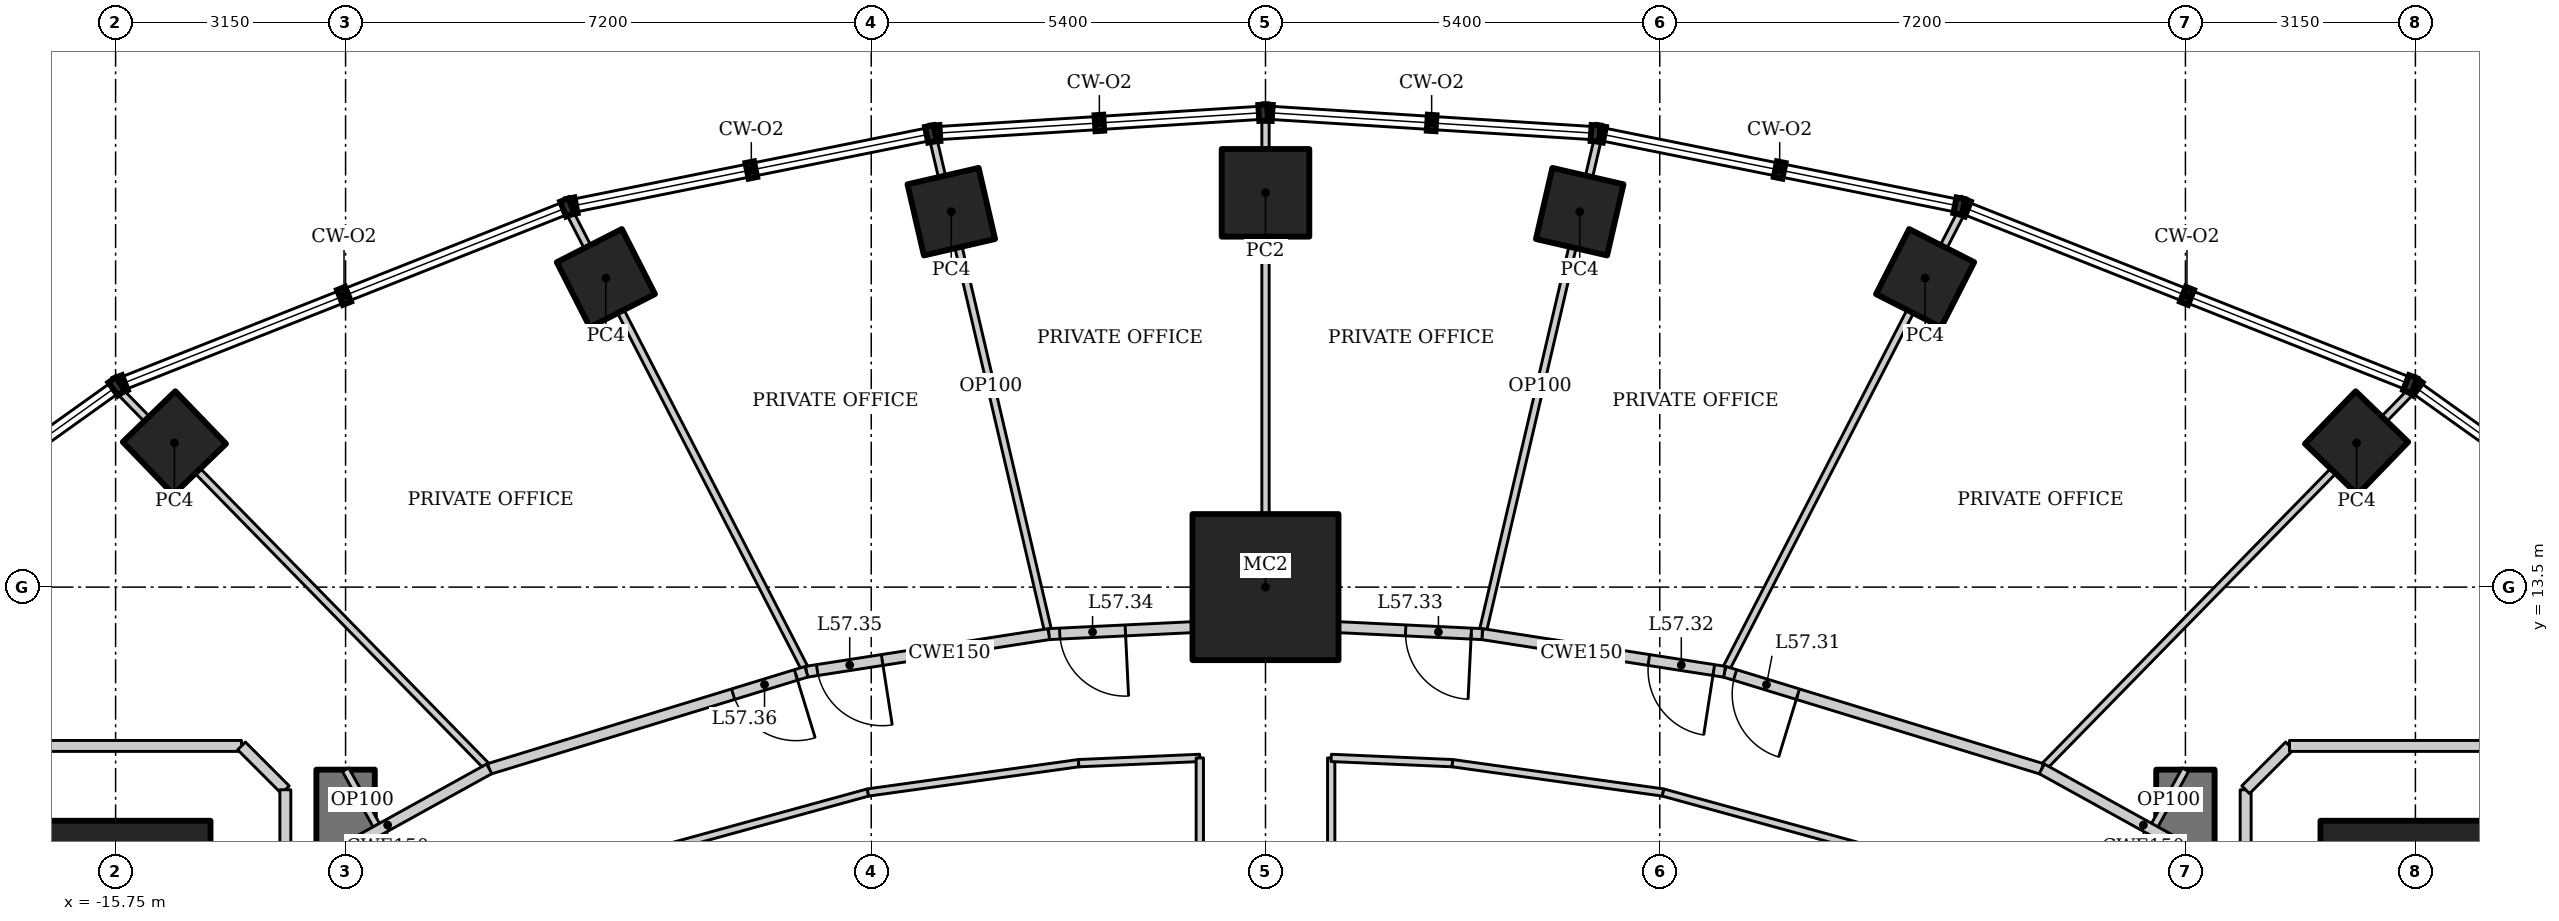
"""IFC4 building model, lengths in metres.
Left out: names, types, materials, properties, quantities, classifications, styles, units other than length and angle.
Written with IfcOpenShell. Run it as: python <this file> out.ifc"""

import sys

from ifc_helpers import new_model, si_unit, direction, frame, frame_2d, origin, origin_2d, place, context, subcontext, project, spatial, rectangle, hollow_rectangle, extrude, element, fill, save


model = new_model("IFC4")
c1 = context("Model", 3, precision=1e-05, world=origin(), true_north=direction((0.0, 1.0)))
c2 = subcontext(c1, "Body", "Model", "MODEL_VIEW")
j1 = project(units=[si_unit("LENGTHUNIT", "METRE"), si_unit("PLANEANGLEUNIT", "RADIAN")], contexts=[c1])
p1 = place(None, origin())
s1 = spatial("IfcSite", under=j1, at=p1, CompositionType="ELEMENT")
p2 = place(p1, origin())
s2 = spatial("IfcBuilding", under=s1, at=p2, CompositionType="ELEMENT")
p3 = place(p2, frame((0.0, 0.0, 245.2)))
s3 = spatial("IfcBuildingStorey", under=s2, at=p3, CompositionType="ELEMENT", Elevation=245.2)
p4 = place(p3, frame((15.75, 9.0, 0.0), z_axis=(0.0, 0.0, 1.0), x_axis=(1.0, 0.0, 0.0)))
e1 = element("IfcColumn", 1, at=p4, inside=s3, PredefinedType="COLUMN", context=c2, shape_type="SweptSolid", body=[
    extrude(hollow_rectangle(XDim=2.6, YDim=2.6, WallThickness=0.13, at=origin_2d()), origin(), (0.0, 0.0, 1.0), 4.2),
])
p5 = place(p3, frame((0.0, 13.5, 0.0), z_axis=(0.0, 0.0, 1.0), x_axis=(1.0, 0.0, 0.0)))
e2 = element("IfcColumn", 2, at=p5, inside=s3, PredefinedType="COLUMN", context=c2, shape_type="SweptSolid", body=[
    extrude(hollow_rectangle(XDim=2.0, YDim=2.0, WallThickness=0.17, at=origin_2d()), origin(), (0.0, 0.0, 1.0), 4.2),
])
p6 = place(p3, frame((-15.75, 9.0, 0.0), z_axis=(0.0, 0.0, 1.0), x_axis=(1.0, 0.0, 0.0)))
e3 = element("IfcColumn", 3, at=p6, inside=s3, PredefinedType="COLUMN", context=c2, shape_type="SweptSolid", body=[
    extrude(hollow_rectangle(XDim=2.6, YDim=2.6, WallThickness=0.13, at=origin_2d()), origin(), (0.0, 0.0, 1.0), 4.2),
])
for number, where, z_axis, x_axis in (
    (4, (14.944, 15.475, 0.0), (0.0, 0.0, 1.0), (0.695, 0.719, 0.0)),
    (5, (9.035, 17.731, 0.0), (0.0, 0.0, 1.0), (0.454, 0.891, 0.0)),
    (6, (4.304, 18.642, 0.0), (0.0, 0.0, 1.0), (0.225, 0.974, 0.0)),
):
    element("IfcColumn", number, at=place(p3, frame(where, z_axis=z_axis, x_axis=x_axis)), inside=s3, PredefinedType="COLUMN", context=c2, shape_type="SweptSolid", body=[
        extrude(hollow_rectangle(XDim=1.0, YDim=1.0, WallThickness=0.08, at=origin_2d()), origin(), (0.0, 0.0, 1.0), 4.2),
    ])
p7 = place(p3, frame((0.0, 18.9, 0.0), z_axis=(0.0, 0.0, 1.0), x_axis=(1.0, 0.0, 0.0)))
e7 = element("IfcColumn", 7, at=p7, inside=s3, PredefinedType="COLUMN", context=c2, shape_type="SweptSolid", body=[
    extrude(hollow_rectangle(XDim=1.2, YDim=1.2, WallThickness=0.1, at=origin_2d()), origin(), (0.0, 0.0, 1.0), 4.2),
])
for number, where, z_axis, x_axis in (
    (8, (-4.304, 18.642, 0.0), (0.0, 0.0, 1.0), (0.974, 0.225, 0.0)),
    (9, (-9.035, 17.731, 0.0), (0.0, 0.0, 1.0), (0.891, 0.454, 0.0)),
    (10, (-14.944, 15.475, 0.0), (0.0, 0.0, 1.0), (0.719, 0.695, 0.0)),
):
    element("IfcColumn", number, at=place(p3, frame(where, z_axis=z_axis, x_axis=x_axis)), inside=s3, PredefinedType="COLUMN", context=c2, shape_type="SweptSolid", body=[
        extrude(hollow_rectangle(XDim=1.0, YDim=1.0, WallThickness=0.08, at=origin_2d()), origin(), (0.0, 0.0, 1.0), 4.2),
    ])
p8 = place(p3, frame((12.6, -11.0, 0.0), z_axis=(0.0, 0.0, 1.0), x_axis=(0.0, 1.0, 0.0)))
e11 = element("IfcWall", 11, at=p8, inside=s3, PredefinedType="SHEAR", context=c2, shape_type="SweptSolid", body=[
    extrude(rectangle(XDim=22.0, YDim=0.8, at=frame_2d((11.0, 0.0))), origin(), (0.0, 0.0, 1.0), 4.2),
])
p9 = place(p8, frame((10.1, 0.0, 0.0)))
e12 = element("IfcOpeningElement", 12, at=p9, cuts=e11, PredefinedType="OPENING", context=c2, shape_type="SweptSolid", body=[
    extrude(rectangle(XDim=1.8, YDim=2.1, at=frame_2d((0.9, 1.05))), frame((0.0, 0.41, 0.0), z_axis=(0.0, -1.0, 0.0), x_axis=(1.0, 0.0, 0.0)), (0.0, 0.0, 1.0), 0.82),
])
p10 = place(p3, frame((-12.6, 11.0, 0.0), z_axis=(0.0, 0.0, 1.0), x_axis=(0.0, -1.0, 0.0)))
e13 = element("IfcWall", 13, at=p10, inside=s3, PredefinedType="SHEAR", context=c2, shape_type="SweptSolid", body=[
    extrude(rectangle(XDim=22.0, YDim=0.8, at=frame_2d((11.0, 0.0))), origin(), (0.0, 0.0, 1.0), 4.2),
])
p11 = place(p10, frame((10.1, 0.0, 0.0)))
e14 = element("IfcOpeningElement", 14, at=p11, cuts=e13, PredefinedType="OPENING", context=c2, shape_type="SweptSolid", body=[
    extrude(rectangle(XDim=1.8, YDim=2.1, at=frame_2d((0.9, 1.05))), frame((0.0, 0.41, 0.0), z_axis=(0.0, -1.0, 0.0), x_axis=(1.0, 0.0, 0.0)), (0.0, 0.0, 1.0), 0.82),
])
p12 = place(p3, frame((15.709, 16.199, 0.0), z_axis=(0.0, 0.0, 1.0), x_axis=(-0.699362525935, -0.714767135029, 0.0)))
e15 = element("IfcWall", 15, at=p12, inside=s3, PredefinedType="PARTITIONING", context=c2, shape_type="SweptSolid", body=[
    extrude(rectangle(XDim=7.259, YDim=0.1, at=frame_2d((3.629, 0.0))), origin(), (0.0, 0.0, 1.0), 3.41),
])
p13 = place(p3, frame((9.54, 18.65, 0.0), z_axis=(0.0, 0.0, 1.0), x_axis=(-0.45810402165, -0.88889859115, 0.0)))
e16 = element("IfcWall", 16, at=p13, inside=s3, PredefinedType="PARTITIONING", context=c2, shape_type="SweptSolid", body=[
    extrude(rectangle(XDim=7.098, YDim=0.1, at=frame_2d((3.549, 0.0))), origin(), (0.0, 0.0, 1.0), 3.108),
])
p14 = place(p3, frame((4.556, 19.657, 0.0), z_axis=(0.0, 0.0, 1.0), x_axis=(-0.22733791689, -0.973815933092, 0.0)))
e17 = element("IfcWall", 17, at=p14, inside=s3, PredefinedType="PARTITIONING", context=c2, shape_type="SweptSolid", body=[
    extrude(rectangle(XDim=6.984, YDim=0.1, at=frame_2d((3.492, 0.0))), origin(), (0.0, 0.0, 1.0), 3.108),
])
p15 = place(p3, frame((0.0, 19.945, 0.0), z_axis=(0.0, 0.0, 1.0), x_axis=(0.0, -1.0, 0.0)))
e18 = element("IfcWall", 18, at=p15, inside=s3, PredefinedType="PARTITIONING", context=c2, shape_type="SweptSolid", body=[
    extrude(rectangle(XDim=6.945, YDim=0.1, at=frame_2d((3.472, 0.0))), origin(), (0.0, 0.0, 1.0), 3.644),
])
p16 = place(p3, frame((-4.556, 19.657, 0.0), z_axis=(0.0, 0.0, 1.0), x_axis=(0.22733791689, -0.973815933092, 0.0)))
e19 = element("IfcWall", 19, at=p16, inside=s3, PredefinedType="PARTITIONING", context=c2, shape_type="SweptSolid", body=[
    extrude(rectangle(XDim=6.984, YDim=0.1, at=frame_2d((3.492, 0.0))), origin(), (0.0, 0.0, 1.0), 3.108),
])
p17 = place(p3, frame((-9.54, 18.65, 0.0), z_axis=(0.0, 0.0, 1.0), x_axis=(0.45810402165, -0.88889859115, 0.0)))
e20 = element("IfcWall", 20, at=p17, inside=s3, PredefinedType="PARTITIONING", context=c2, shape_type="SweptSolid", body=[
    extrude(rectangle(XDim=7.098, YDim=0.1, at=frame_2d((3.549, 0.0))), origin(), (0.0, 0.0, 1.0), 3.108),
])
p18 = place(p3, frame((-15.709, 16.199, 0.0), z_axis=(0.0, 0.0, 1.0), x_axis=(0.699362525935, -0.714767135029, 0.0)))
e21 = element("IfcWall", 21, at=p18, inside=s3, PredefinedType="PARTITIONING", context=c2, shape_type="SweptSolid", body=[
    extrude(rectangle(XDim=7.259, YDim=0.1, at=frame_2d((3.629, 0.0))), origin(), (0.0, 0.0, 1.0), 3.41),
])
p19 = place(p3, frame((10.633, 11.01, 0.0), z_axis=(0.0, 0.0, 1.0), x_axis=(-0.956185837153, 0.292760388079, 0.0)))
e22 = element("IfcWall", 22, at=p19, inside=s3, PredefinedType="PARTITIONING", context=c2, shape_type="SweptSolid", body=[
    extrude(rectangle(XDim=4.544, YDim=0.15, at=frame_2d((2.272, 0.0))), origin(), (0.0, 0.0, 1.0), 4.05),
])
p20 = place(p19, frame((3.494, 0.0, 0.0)))
e23 = element("IfcOpeningElement", 23, at=p20, cuts=e22, PredefinedType="OPENING", context=c2, shape_type="SweptSolid", body=[
    extrude(rectangle(XDim=0.9, YDim=2.1, at=frame_2d((0.45, 1.05))), frame((0.0, 0.085, 0.0), z_axis=(0.0, -1.0, 0.0), x_axis=(1.0, 0.0, 0.0)), (0.0, 0.0, 1.0), 0.17),
])
p21 = place(p3, frame((6.288, 12.341, 0.0), z_axis=(0.0, 0.0, 1.0), x_axis=(-0.988174283057, 0.153334882869, 0.0)))
e24 = element("IfcWall", 24, at=p21, inside=s3, PredefinedType="PARTITIONING", context=c2, shape_type="SweptSolid", body=[
    extrude(rectangle(XDim=3.36, YDim=0.15, at=frame_2d((1.68, 0.0))), origin(), (0.0, 0.0, 1.0), 4.05),
])
p22 = place(p21, frame((0.15, 0.0, 0.0)))
e25 = element("IfcOpeningElement", 25, at=p22, cuts=e24, PredefinedType="OPENING", context=c2, shape_type="SweptSolid", body=[
    extrude(rectangle(XDim=0.9, YDim=2.1, at=frame_2d((0.45, 1.05))), frame((0.0, 0.085, 0.0), z_axis=(0.0, -1.0, 0.0), x_axis=(1.0, 0.0, 0.0)), (0.0, 0.0, 1.0), 0.17),
])
p23 = place(p3, frame((2.968, 12.856, 0.0), z_axis=(0.0, 0.0, 1.0), x_axis=(-0.998824412818, 0.04847465687, 0.0)))
e26 = element("IfcWall", 26, at=p23, inside=s3, PredefinedType="PARTITIONING", context=c2, shape_type="SweptSolid", body=[
    extrude(rectangle(XDim=2.971, YDim=0.15, at=frame_2d((1.486, 0.0))), origin(), (0.0, 0.0, 1.0), 4.05),
])
p24 = place(p23, frame((0.15, 0.0, 0.0)))
e27 = element("IfcOpeningElement", 27, at=p24, cuts=e26, PredefinedType="OPENING", context=c2, shape_type="SweptSolid", body=[
    extrude(rectangle(XDim=0.9, YDim=2.1, at=frame_2d((0.45, 1.05))), frame((0.0, 0.085, 0.0), z_axis=(0.0, -1.0, 0.0), x_axis=(1.0, 0.0, 0.0)), (0.0, 0.0, 1.0), 0.17),
])
p25 = place(p3, frame((0.0, 13.0, 0.0), z_axis=(0.0, 0.0, 1.0), x_axis=(-0.998824412818, -0.04847465687, 0.0)))
e28 = element("IfcWall", 28, at=p25, inside=s3, PredefinedType="PARTITIONING", context=c2, shape_type="SweptSolid", body=[
    extrude(rectangle(XDim=2.971, YDim=0.15, at=frame_2d((1.486, 0.0))), origin(), (0.0, 0.0, 1.0), 4.05),
])
p26 = place(p25, frame((1.921, 0.0, 0.0)))
e29 = element("IfcOpeningElement", 29, at=p26, cuts=e28, PredefinedType="OPENING", context=c2, shape_type="SweptSolid", body=[
    extrude(rectangle(XDim=0.9, YDim=2.1, at=frame_2d((0.45, 1.05))), frame((0.0, 0.085, 0.0), z_axis=(0.0, -1.0, 0.0), x_axis=(1.0, 0.0, 0.0)), (0.0, 0.0, 1.0), 0.17),
])
p27 = place(p3, frame((-2.968, 12.856, 0.0), z_axis=(0.0, 0.0, 1.0), x_axis=(-0.988174283057, -0.153334882869, 0.0)))
e30 = element("IfcWall", 30, at=p27, inside=s3, PredefinedType="PARTITIONING", context=c2, shape_type="SweptSolid", body=[
    extrude(rectangle(XDim=3.36, YDim=0.15, at=frame_2d((1.68, 0.0))), origin(), (0.0, 0.0, 1.0), 4.05),
])
p28 = place(p27, frame((2.31, 0.0, 0.0)))
e31 = element("IfcOpeningElement", 31, at=p28, cuts=e30, PredefinedType="OPENING", context=c2, shape_type="SweptSolid", body=[
    extrude(rectangle(XDim=0.9, YDim=2.1, at=frame_2d((0.45, 1.05))), frame((0.0, 0.085, 0.0), z_axis=(0.0, -1.0, 0.0), x_axis=(1.0, 0.0, 0.0)), (0.0, 0.0, 1.0), 0.17),
])
p29 = place(p3, frame((-6.288, 12.341, 0.0), z_axis=(0.0, 0.0, 1.0), x_axis=(-0.956185837153, -0.292760388079, 0.0)))
e32 = element("IfcWall", 32, at=p29, inside=s3, PredefinedType="PARTITIONING", context=c2, shape_type="SweptSolid", body=[
    extrude(rectangle(XDim=4.544, YDim=0.15, at=frame_2d((2.272, 0.0))), origin(), (0.0, 0.0, 1.0), 4.05),
])
p30 = place(p29, frame((0.15, 0.0, 0.0)))
e33 = element("IfcOpeningElement", 33, at=p30, cuts=e32, PredefinedType="OPENING", context=c2, shape_type="SweptSolid", body=[
    extrude(rectangle(XDim=0.9, YDim=2.1, at=frame_2d((0.45, 1.05))), frame((0.0, 0.085, 0.0), z_axis=(0.0, -1.0, 0.0), x_axis=(1.0, 0.0, 0.0)), (0.0, 0.0, 1.0), 0.17),
])
p31 = place(p3, frame((0.9, 8.8, 0.0), z_axis=(0.0, 0.0, 1.0), x_axis=(0.0, 1.0, 0.0)))
e34 = element("IfcWall", 34, at=p31, inside=s3, PredefinedType="PARTITIONING", context=c2, shape_type="SweptSolid", body=[
    extrude(rectangle(XDim=2.361, YDim=0.1, at=frame_2d((1.18, 0.0))), origin(), (0.0, 0.0, 1.0), 4.05),
])
p32 = place(p3, frame((0.9, 11.161, 0.0), z_axis=(0.0, 0.0, 1.0), x_axis=(0.999053939397, -0.043488230303, 0.0)))
e35 = element("IfcWall", 35, at=p32, inside=s3, PredefinedType="PARTITIONING", context=c2, shape_type="SweptSolid", body=[
    extrude(rectangle(XDim=1.662, YDim=0.1, at=frame_2d((0.831, 0.0))), origin(), (0.0, 0.0, 1.0), 4.05),
])
p33 = place(p3, frame((2.56, 11.089, 0.0), z_axis=(0.0, 0.0, 1.0), x_axis=(0.99045099049, -0.137865280027, 0.0)))
e36 = element("IfcWall", 36, at=p33, inside=s3, PredefinedType="PARTITIONING", context=c2, shape_type="SweptSolid", body=[
    extrude(rectangle(XDim=2.913, YDim=0.1, at=frame_2d((1.457, 0.0))), origin(), (0.0, 0.0, 1.0), 4.05),
])
for number, where, z_axis, x_axis in (
    (37, (5.445, 10.687, 0.0), (0.0, 0.0, 1.0), (0.964, -0.265, 0.0)),
    (38, (-9.298, 9.628, 0.0), (0.0, 0.0, 1.0), (0.964, 0.265, 0.0)),
):
    element("IfcWall", number, at=place(p3, frame(where, z_axis=z_axis, x_axis=x_axis)), inside=s3, PredefinedType="PARTITIONING", context=c2, shape_type="SweptSolid", body=[
        extrude(rectangle(XDim=3.995, YDim=0.1, at=frame_2d((1.998, 0.0))), origin(), (0.0, 0.0, 1.0), 4.05),
    ])
p34 = place(p3, frame((-5.445, 10.687, 0.0), z_axis=(0.0, 0.0, 1.0), x_axis=(0.99045099049, 0.137865280027, 0.0)))
e39 = element("IfcWall", 39, at=p34, inside=s3, PredefinedType="PARTITIONING", context=c2, shape_type="SweptSolid", body=[
    extrude(rectangle(XDim=2.913, YDim=0.1, at=frame_2d((1.457, 0.0))), origin(), (0.0, 0.0, 1.0), 4.05),
])
p35 = place(p3, frame((-2.56, 11.089, 0.0), z_axis=(0.0, 0.0, 1.0), x_axis=(0.999053939397, 0.043488230303, 0.0)))
e40 = element("IfcWall", 40, at=p35, inside=s3, PredefinedType="PARTITIONING", context=c2, shape_type="SweptSolid", body=[
    extrude(rectangle(XDim=1.662, YDim=0.1, at=frame_2d((0.831, 0.0))), origin(), (0.0, 0.0, 1.0), 4.05),
])
p36 = place(p3, frame((-0.9, 11.161, 0.0), z_axis=(0.0, 0.0, 1.0), x_axis=(0.0, -1.0, 0.0)))
e41 = element("IfcWall", 41, at=p36, inside=s3, PredefinedType="PARTITIONING", context=c2, shape_type="SweptSolid", body=[
    extrude(rectangle(XDim=2.361, YDim=0.1, at=frame_2d((1.18, 0.0))), origin(), (0.0, 0.0, 1.0), 4.05),
])
for number, where, z_axis, x_axis in (
    (42, (12.6, 11.0, 0.0), (0.0, 0.0, 1.0), (-0.484, -0.875, 0.0)),
    (43, (-12.6, 11.0, 0.0), (0.0, 0.0, 1.0), (0.484, -0.875, 0.0)),
):
    element("IfcWall", number, at=place(p3, frame(where, z_axis=z_axis, x_axis=x_axis)), inside=s3, PredefinedType="PARTITIONING", context=c2, shape_type="SweptSolid", body=[
        extrude(rectangle(XDim=0.943, YDim=0.1, at=frame_2d((0.472, 0.0))), origin(), (0.0, 0.0, 1.0), 4.05),
    ])
p37 = place(p3, frame((-10.633, 11.01, 0.0), z_axis=(0.0, 0.0, 1.0), x_axis=(-0.875072100837, -0.483992580869, 0.0)))
e44 = element("IfcWall", 44, at=p37, inside=s3, PredefinedType="PARTITIONING", context=c2, shape_type="SweptSolid", body=[
    extrude(rectangle(XDim=3.179, YDim=0.15, at=frame_2d((1.59, 0.0))), origin(), (0.0, 0.0, 1.0), 4.05),
])
p38 = place(p3, frame((-17.475, 11.325, 0.0), z_axis=(0.0, 0.0, 1.0), x_axis=(1.0, 0.0, 0.0)))
e45 = element("IfcWall", 45, at=p38, inside=s3, PredefinedType="PARTITIONING", context=c2, shape_type="SweptSolid", body=[
    extrude(rectangle(XDim=3.449, YDim=0.15, at=frame_2d((1.725, 0.0))), origin(), (0.0, 0.0, 1.0), 4.05),
])
p39 = place(p3, frame((-14.025, 11.325, 0.0), z_axis=(0.0, 0.0, 1.0), x_axis=(0.707106781187, -0.707106781187, 0.0)))
e46 = element("IfcWall", 46, at=p39, inside=s3, PredefinedType="PARTITIONING", context=c2, shape_type="SweptSolid", body=[
    extrude(rectangle(XDim=0.849, YDim=0.15, at=frame_2d((0.425, 0.0))), origin(), (0.0, 0.0, 1.0), 4.05),
])
p40 = place(p3, frame((-13.425, 10.725, 0.0), z_axis=(0.0, 0.0, 1.0), x_axis=(0.0, -1.0, 0.0)))
e47 = element("IfcWall", 47, at=p40, inside=s3, PredefinedType="PARTITIONING", context=c2, shape_type="SweptSolid", body=[
    extrude(rectangle(XDim=1.138, YDim=0.15, at=frame_2d((0.569, 0.0))), origin(), (0.0, 0.0, 1.0), 4.05),
])
p41 = place(p3, frame((13.415, 9.472, 0.0), z_axis=(0.0, 0.0, 1.0), x_axis=(-0.875072100837, 0.483992580869, 0.0)))
e48 = element("IfcWall", 48, at=p41, inside=s3, PredefinedType="PARTITIONING", context=c2, shape_type="SweptSolid", body=[
    extrude(rectangle(XDim=3.179, YDim=0.15, at=frame_2d((1.59, 0.0))), origin(), (0.0, 0.0, 1.0), 4.05),
])
p42 = place(p3, frame((13.425, 9.586, 0.0), z_axis=(0.0, 0.0, 1.0), x_axis=(0.0, 1.0, 0.0)))
e49 = element("IfcWall", 49, at=p42, inside=s3, PredefinedType="PARTITIONING", context=c2, shape_type="SweptSolid", body=[
    extrude(rectangle(XDim=1.138, YDim=0.15, at=frame_2d((0.569, 0.0))), origin(), (0.0, 0.0, 1.0), 4.05),
])
p43 = place(p3, frame((13.425, 10.725, 0.0), z_axis=(0.0, 0.0, 1.0), x_axis=(0.707106781187, 0.707106781187, 0.0)))
e50 = element("IfcWall", 50, at=p43, inside=s3, PredefinedType="PARTITIONING", context=c2, shape_type="SweptSolid", body=[
    extrude(rectangle(XDim=0.849, YDim=0.15, at=frame_2d((0.425, 0.0))), origin(), (0.0, 0.0, 1.0), 4.05),
])
p44 = place(p3, frame((14.025, 11.325, 0.0), z_axis=(0.0, 0.0, 1.0), x_axis=(1.0, 0.0, 0.0)))
e51 = element("IfcWall", 51, at=p44, inside=s3, PredefinedType="PARTITIONING", context=c2, shape_type="SweptSolid", body=[
    extrude(rectangle(XDim=3.449, YDim=0.15, at=frame_2d((1.725, 0.0))), origin(), (0.0, 0.0, 1.0), 4.05),
])
p45 = place(p20, origin())
e52 = element("IfcDoor", 52, at=p45, inside=s3, OperationType="SINGLE_SWING_LEFT", PredefinedType="DOOR", context=c2, shape_type="SweptSolid", body=[
    extrude(rectangle(XDim=0.9, YDim=2.1, at=frame_2d((0.45, 1.05))), frame((0.0, 0.025, 0.0), z_axis=(0.0, -1.0, 0.0), x_axis=(1.0, 0.0, 0.0)), (0.0, 0.0, 1.0), 0.05),
])
fill(e23, e52)
p46 = place(p22, origin())
e53 = element("IfcDoor", 53, at=p46, inside=s3, OperationType="SINGLE_SWING_LEFT", PredefinedType="DOOR", context=c2, shape_type="SweptSolid", body=[
    extrude(rectangle(XDim=0.9, YDim=2.1, at=frame_2d((0.45, 1.05))), frame((0.0, 0.025, 0.0), z_axis=(0.0, -1.0, 0.0), x_axis=(1.0, 0.0, 0.0)), (0.0, 0.0, 1.0), 0.05),
])
fill(e25, e53)
p47 = place(p24, origin())
e54 = element("IfcDoor", 54, at=p47, inside=s3, OperationType="SINGLE_SWING_LEFT", PredefinedType="DOOR", context=c2, shape_type="SweptSolid", body=[
    extrude(rectangle(XDim=0.9, YDim=2.1, at=frame_2d((0.45, 1.05))), frame((0.0, 0.025, 0.0), z_axis=(0.0, -1.0, 0.0), x_axis=(1.0, 0.0, 0.0)), (0.0, 0.0, 1.0), 0.05),
])
fill(e27, e54)
p48 = place(p26, origin())
e55 = element("IfcDoor", 55, at=p48, inside=s3, OperationType="SINGLE_SWING_LEFT", PredefinedType="DOOR", context=c2, shape_type="SweptSolid", body=[
    extrude(rectangle(XDim=0.9, YDim=2.1, at=frame_2d((0.45, 1.05))), frame((0.0, 0.025, 0.0), z_axis=(0.0, -1.0, 0.0), x_axis=(1.0, 0.0, 0.0)), (0.0, 0.0, 1.0), 0.05),
])
fill(e29, e55)
p49 = place(p28, origin())
e56 = element("IfcDoor", 56, at=p49, inside=s3, OperationType="SINGLE_SWING_LEFT", PredefinedType="DOOR", context=c2, shape_type="SweptSolid", body=[
    extrude(rectangle(XDim=0.9, YDim=2.1, at=frame_2d((0.45, 1.05))), frame((0.0, 0.025, 0.0), z_axis=(0.0, -1.0, 0.0), x_axis=(1.0, 0.0, 0.0)), (0.0, 0.0, 1.0), 0.05),
])
fill(e31, e56)
p50 = place(p30, origin())
e57 = element("IfcDoor", 57, at=p50, inside=s3, OperationType="SINGLE_SWING_LEFT", PredefinedType="DOOR", context=c2, shape_type="SweptSolid", body=[
    extrude(rectangle(XDim=0.9, YDim=2.1, at=frame_2d((0.45, 1.05))), frame((0.0, 0.025, 0.0), z_axis=(0.0, -1.0, 0.0), x_axis=(1.0, 0.0, 0.0)), (0.0, 0.0, 1.0), 0.05),
])
fill(e33, e57)
save(model, sys.argv[1])
